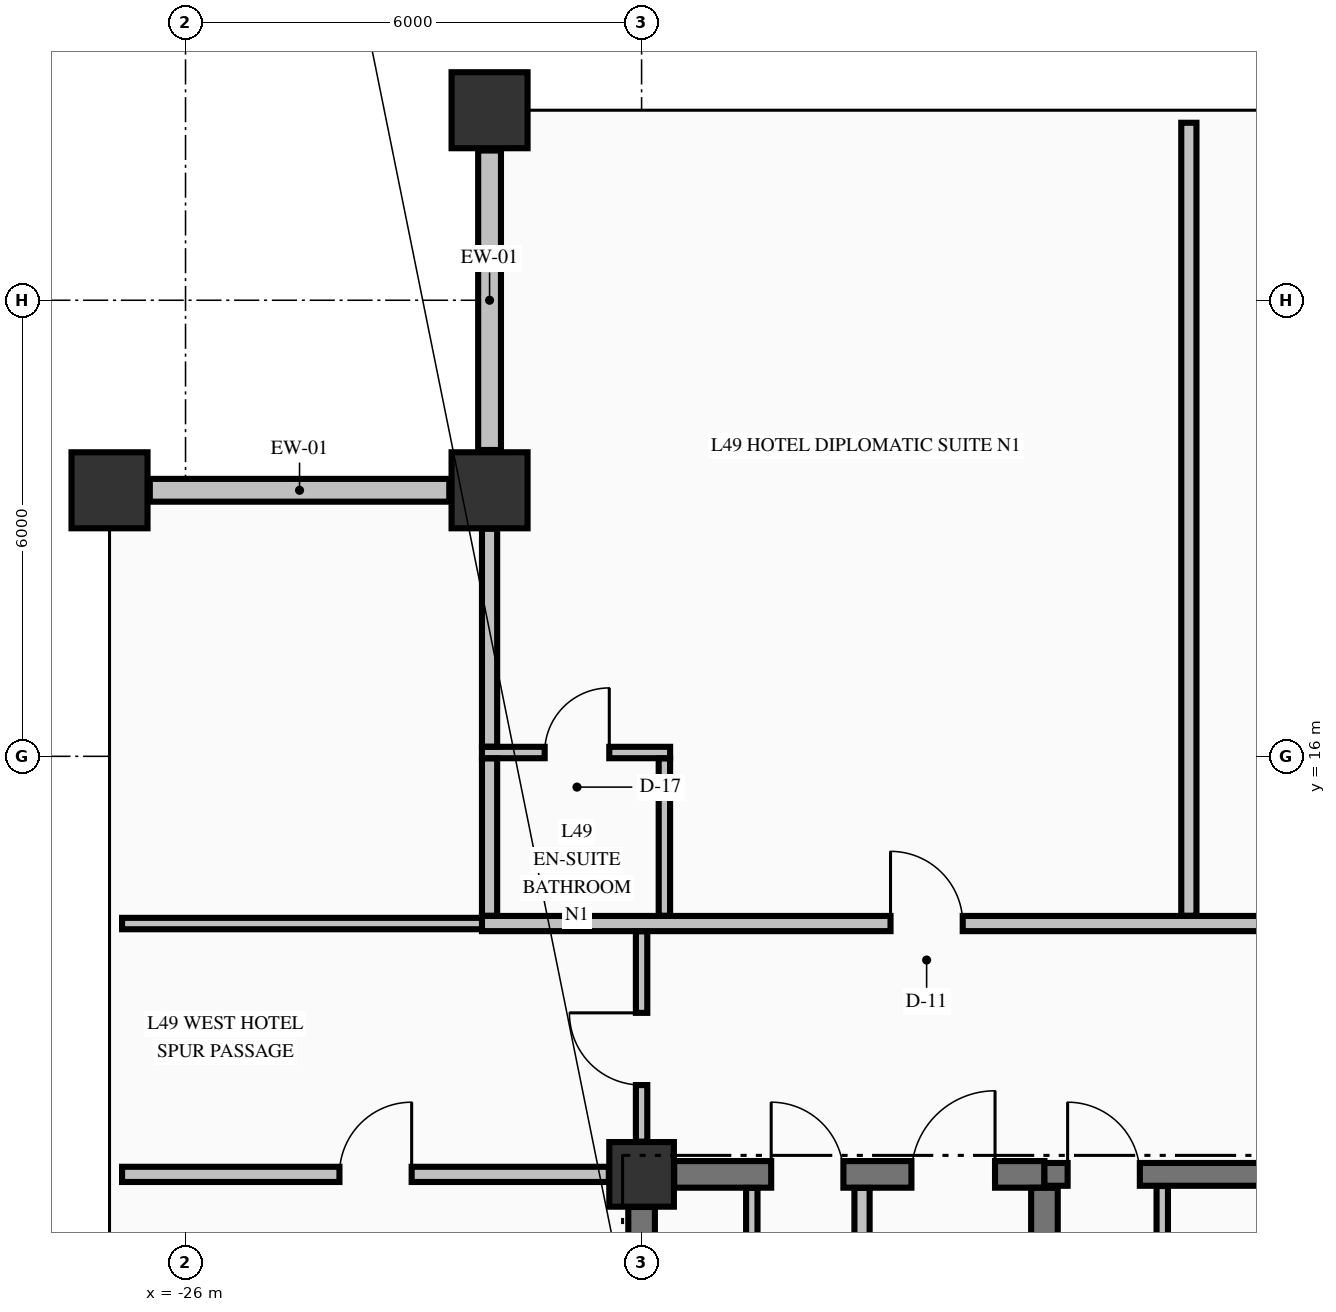
"""IFC4 building model, lengths in metres.
Left out: names, types, materials, properties, quantities, classifications, styles, units other than length and angle.
Written with IfcOpenShell. Run it as: python <this file> out.ifc"""

import sys

from ifc_helpers import new_model, si_unit, direction, frame, frame_2d, origin, origin_2d, place, context, subcontext, project, spatial, rectangle, extrude, element, fill, save


model = new_model("IFC4")
c1 = context("Model", 3, precision=1e-05, world=origin(), true_north=direction((0.0, 1.0)))
c2 = subcontext(c1, "Body", "Model", "MODEL_VIEW")
j1 = project(units=[si_unit("LENGTHUNIT", "METRE"), si_unit("PLANEANGLEUNIT", "RADIAN")], contexts=[c1])
p1 = place(None, origin())
s1 = spatial("IfcSite", under=j1, at=p1, CompositionType="ELEMENT")
p2 = place(p1, origin())
s2 = spatial("IfcBuilding", under=s1, at=p2, CompositionType="ELEMENT")
p3 = place(p2, frame((0.0, 0.0, 191.46)))
s3 = spatial("IfcBuildingStorey", under=s2, at=p3, CompositionType="ELEMENT", Elevation=191.46)
for number, where, z_axis, x_axis in (
    (1, (-22.0, 24.5, -0.425), (0.0, 0.0, 1.0), (1.0, 0.0, 0.0)),
    (2, (-27.0, 19.5, -0.425), (0.0, 0.0, 1.0), (1.0, 0.0, 0.0)),
    (3, (-22.0, 19.5, -0.425), (0.0, 0.0, 1.0), (1.0, 0.0, 0.0)),
):
    element("IfcColumn", number, at=place(p3, frame(where, z_axis=z_axis, x_axis=x_axis)), inside=s3, PredefinedType="COLUMN", context=c2, shape_type="SweptSolid", body=[
        extrude(rectangle(XDim=1.0, YDim=1.0, at=origin_2d()), origin(), (0.0, 0.0, 1.0), 3.55),
    ])
p4 = place(p3, frame((-20.0, 10.5, -0.425), z_axis=(0.0, 0.0, 1.0), x_axis=(1.0, 0.0, 0.0)))
e4 = element("IfcColumn", 4, at=p4, inside=s3, PredefinedType="COLUMN", context=c2, shape_type="SweptSolid", body=[
    extrude(rectangle(XDim=0.85, YDim=0.85, at=origin_2d()), origin(), (0.0, 0.0, 1.0), 3.55),
])
for number, where, z_axis, x_axis in (
    (5, (-22.0, 23.97, 0.0), (0.0, 0.0, 1.0), (0.0, -1.0, 0.0)),
    (6, (-22.53, 19.5, 0.0), (0.0, 0.0, 1.0), (-1.0, 0.0, 0.0)),
):
    element("IfcWall", number, at=place(p3, frame(where, z_axis=z_axis, x_axis=x_axis)), inside=s3, PredefinedType="STANDARD", context=c2, shape_type="SweptSolid", body=[
        extrude(rectangle(XDim=3.94, YDim=0.3, at=frame_2d((1.97, 0.0))), origin(), (0.0, 0.0, 1.0), 1.317),
    ])
p5 = place(p3, frame((-19.571, 10.5, 0.0), z_axis=(0.0, 0.0, 1.0), x_axis=(1.0, 0.0, 0.0)))
e7 = element("IfcWall", 7, at=p5, inside=s3, PredefinedType="SHEAR", context=c2, shape_type="SweptSolid", body=[
    extrude(rectangle(XDim=4.871, YDim=0.35, at=frame_2d((2.436, 0.0))), origin(), (0.0, 0.0, 1.0), 3.125),
])
p6 = place(p5, frame((3.121, 0.0, 0.0)))
e8 = element("IfcOpeningElement", 8, at=p6, cuts=e7, PredefinedType="OPENING", context=c2, shape_type="SweptSolid", body=[
    extrude(rectangle(XDim=1.1, YDim=2.15, at=frame_2d((0.55, 1.075))), frame((0.0, 0.185, 0.0), z_axis=(0.0, -1.0, 0.0), x_axis=(1.0, 0.0, 0.0)), (0.0, 0.0, 1.0), 0.37),
])
p7 = place(p5, frame((1.276, 0.0, 0.0)))
e9 = element("IfcOpeningElement", 9, at=p7, cuts=e7, PredefinedType="OPENING", context=c2, shape_type="SweptSolid", body=[
    extrude(rectangle(XDim=0.95, YDim=2.15, at=frame_2d((0.475, 1.075))), frame((0.0, 0.185, 0.0), z_axis=(0.0, -1.0, 0.0), x_axis=(1.0, 0.0, 0.0)), (0.0, 0.0, 1.0), 0.37),
])
p8 = place(p3, frame((-14.7, 10.5, 0.0), z_axis=(0.0, 0.0, 1.0), x_axis=(1.0, 0.0, 0.0)))
e10 = element("IfcWall", 10, at=p8, inside=s3, PredefinedType="SHEAR", context=c2, shape_type="SweptSolid", body=[
    extrude(rectangle(XDim=3.271, YDim=0.3, at=frame_2d((1.635, 0.0))), origin(), (0.0, 0.0, 1.0), 3.125),
])
p9 = place(p8, frame((0.305, 0.0, 0.0)))
e11 = element("IfcOpeningElement", 11, at=p9, cuts=e10, PredefinedType="OPENING", context=c2, shape_type="SweptSolid", body=[
    extrude(rectangle(XDim=0.95, YDim=2.15, at=frame_2d((0.475, 1.075))), frame((0.0, 0.16, 0.0), z_axis=(0.0, -1.0, 0.0), x_axis=(1.0, 0.0, 0.0)), (0.0, 0.0, 1.0), 0.32),
])
p10 = place(p3, frame((-26.835, 10.5, 0.0), z_axis=(0.0, 0.0, 1.0), x_axis=(1.0, 0.0, 0.0)))
e12 = element("IfcWall", 12, at=p10, inside=s3, PredefinedType="PARTITIONING", context=c2, shape_type="SweptSolid", body=[
    extrude(rectangle(XDim=6.404, YDim=0.2, at=frame_2d((3.202, 0.0))), origin(), (0.0, 0.0, 1.0), 3.125),
])
p11 = place(p10, frame((2.86, 0.0, 0.0)))
e13 = element("IfcOpeningElement", 13, at=p11, cuts=e12, PredefinedType="OPENING", context=c2, shape_type="SweptSolid", body=[
    extrude(rectangle(XDim=0.95, YDim=2.15, at=frame_2d((0.475, 1.075))), frame((0.0, 0.11, 0.0), z_axis=(0.0, -1.0, 0.0), x_axis=(1.0, 0.0, 0.0)), (0.0, 0.0, 1.0), 0.22),
])
p12 = place(p3, frame((-26.835, 13.8, 0.0), z_axis=(0.0, 0.0, 1.0), x_axis=(1.0, 0.0, 0.0)))
e14 = element("IfcWall", 14, at=p12, inside=s3, PredefinedType="PARTITIONING", context=c2, shape_type="SweptSolid", body=[
    extrude(rectangle(XDim=4.935, YDim=0.15, at=frame_2d((2.468, 0.0))), origin(), (0.0, 0.0, 1.0), 3.125),
])
p13 = place(p3, frame((-22.1, 13.8, 0.0), z_axis=(0.0, 0.0, 1.0), x_axis=(1.0, 0.0, 0.0)))
e15 = element("IfcWall", 15, at=p13, inside=s3, PredefinedType="PARTITIONING", context=c2, shape_type="SweptSolid", body=[
    extrude(rectangle(XDim=39.2, YDim=0.2, at=frame_2d((19.6, 0.0))), origin(), (0.0, 0.0, 1.0), 3.125),
])
p14 = place(p13, frame((5.375, 0.0, 0.0)))
e16 = element("IfcOpeningElement", 16, at=p14, cuts=e15, PredefinedType="OPENING", context=c2, shape_type="SweptSolid", body=[
    extrude(rectangle(XDim=0.95, YDim=2.15, at=frame_2d((0.475, 1.075))), frame((0.0, 0.11, 0.0), z_axis=(0.0, -1.0, 0.0), x_axis=(1.0, 0.0, 0.0)), (0.0, 0.0, 1.0), 0.22),
])
p15 = place(p13, frame((13.375, 0.0, 0.0)))
e17 = element("IfcOpeningElement", 17, at=p15, cuts=e15, PredefinedType="OPENING", context=c2, shape_type="SweptSolid", body=[
    extrude(rectangle(XDim=1.05, YDim=2.15, at=frame_2d((0.525, 1.075))), frame((0.0, 0.11, 0.0), z_axis=(0.0, -1.0, 0.0), x_axis=(1.0, 0.0, 0.0)), (0.0, 0.0, 1.0), 0.22),
])
p16 = place(p13, frame((23.875, 0.0, 0.0)))
e18 = element("IfcOpeningElement", 18, at=p16, cuts=e15, PredefinedType="OPENING", context=c2, shape_type="SweptSolid", body=[
    extrude(rectangle(XDim=0.95, YDim=2.15, at=frame_2d((0.475, 1.075))), frame((0.0, 0.11, 0.0), z_axis=(0.0, -1.0, 0.0), x_axis=(1.0, 0.0, 0.0)), (0.0, 0.0, 1.0), 0.22),
])
p17 = place(p13, frame((34.175, 0.0, 0.0)))
e19 = element("IfcOpeningElement", 19, at=p17, cuts=e15, PredefinedType="OPENING", context=c2, shape_type="SweptSolid", body=[
    extrude(rectangle(XDim=0.95, YDim=2.15, at=frame_2d((0.475, 1.075))), frame((0.0, 0.11, 0.0), z_axis=(0.0, -1.0, 0.0), x_axis=(1.0, 0.0, 0.0)), (0.0, 0.0, 1.0), 0.22),
])
p18 = place(p3, frame((-22.1, 16.05, 0.0), z_axis=(0.0, 0.0, 1.0), x_axis=(1.0, 0.0, 0.0)))
e20 = element("IfcWall", 20, at=p18, inside=s3, PredefinedType="PARTITIONING", context=c2, shape_type="SweptSolid", body=[
    extrude(rectangle(XDim=2.475, YDim=0.15, at=frame_2d((1.238, 0.0))), origin(), (0.0, 0.0, 1.0), 3.125),
])
p19 = place(p18, frame((0.825, 0.0, 0.0)))
e21 = element("IfcOpeningElement", 21, at=p19, cuts=e20, PredefinedType="OPENING", context=c2, shape_type="SweptSolid", body=[
    extrude(rectangle(XDim=0.85, YDim=2.1, at=frame_2d((0.425, 1.05))), frame((0.0, 0.085, 0.0), z_axis=(0.0, -1.0, 0.0), x_axis=(1.0, 0.0, 0.0)), (0.0, 0.0, 1.0), 0.17),
])
p20 = place(p3, frame((-20.0, 5.327, 0.0), z_axis=(0.0, 0.0, 1.0), x_axis=(0.0, 1.0, 0.0)))
e22 = element("IfcWall", 22, at=p20, inside=s3, PredefinedType="SHEAR", context=c2, shape_type="SweptSolid", body=[
    extrude(rectangle(XDim=4.744, YDim=0.35, at=frame_2d((2.372, 0.0))), origin(), (0.0, 0.0, 1.0), 3.125),
])
p21 = place(p3, frame((-14.7, 5.852, 0.0), z_axis=(0.0, 0.0, 1.0), x_axis=(0.0, 1.0, 0.0)))
e23 = element("IfcWall", 23, at=p21, inside=s3, PredefinedType="SHEAR", context=c2, shape_type="SweptSolid", body=[
    extrude(rectangle(XDim=4.471, YDim=0.35, at=frame_2d((2.235, 0.0))), origin(), (0.0, 0.0, 1.0), 3.125),
])
p22 = place(p3, frame((-22.0, 13.903, 0.0), z_axis=(0.0, 0.0, 1.0), x_axis=(0.0, 1.0, 0.0)))
e24 = element("IfcWall", 24, at=p22, inside=s3, PredefinedType="PARTITIONING", context=c2, shape_type="SweptSolid", body=[
    extrude(rectangle(XDim=2.069, YDim=0.2, at=frame_2d((1.034, 0.0))), origin(), (0.0, 0.0, 1.0), 3.125),
])
p23 = place(p3, frame((-22.0, 16.128, 0.0), z_axis=(0.0, 0.0, 1.0), x_axis=(0.0, 1.0, 0.0)))
e25 = element("IfcWall", 25, at=p23, inside=s3, PredefinedType="PARTITIONING", context=c2, shape_type="SweptSolid", body=[
    extrude(rectangle(XDim=2.866, YDim=0.2, at=frame_2d((1.433, 0.0))), origin(), (0.0, 0.0, 1.0), 3.125),
])
p24 = place(p3, frame((-20.0, 10.931, 0.0), z_axis=(0.0, 0.0, 1.0), x_axis=(0.0, 1.0, 0.0)))
e26 = element("IfcWall", 26, at=p24, inside=s3, PredefinedType="PARTITIONING", context=c2, shape_type="SweptSolid", body=[
    extrude(rectangle(XDim=2.766, YDim=0.15, at=frame_2d((1.383, 0.0))), origin(), (0.0, 0.0, 1.0), 2.317),
])
p25 = place(p24, frame((0.744, 0.0, 0.0)))
e27 = element("IfcOpeningElement", 27, at=p25, cuts=e26, PredefinedType="OPENING", context=c2, shape_type="SweptSolid", body=[
    extrude(rectangle(XDim=0.95, YDim=2.15, at=frame_2d((0.475, 1.075))), frame((0.0, 0.085, 0.0), z_axis=(0.0, -1.0, 0.0), x_axis=(1.0, 0.0, 0.0)), (0.0, 0.0, 1.0), 0.17),
])
p26 = place(p3, frame((-19.7, 13.903, 0.0), z_axis=(0.0, 0.0, 1.0), x_axis=(0.0, 1.0, 0.0)))
e28 = element("IfcWall", 28, at=p26, inside=s3, PredefinedType="PARTITIONING", context=c2, shape_type="SweptSolid", body=[
    extrude(rectangle(XDim=2.069, YDim=0.15, at=frame_2d((1.034, 0.0))), origin(), (0.0, 0.0, 1.0), 2.317),
])
p27 = place(p3, frame((-18.55, 5.328, 0.0), z_axis=(0.0, 0.0, 1.0), x_axis=(0.0, 1.0, 0.0)))
e29 = element("IfcWall", 29, at=p27, inside=s3, PredefinedType="PARTITIONING", context=c2, shape_type="SweptSolid", body=[
    extrude(rectangle(XDim=4.994, YDim=0.15, at=frame_2d((2.497, 0.0))), origin(), (0.0, 0.0, 1.0), 3.125),
])
p28 = place(p27, frame((2.047, 0.0, 0.0)))
e30 = element("IfcOpeningElement", 30, at=p28, cuts=e29, PredefinedType="OPENING", context=c2, shape_type="SweptSolid", body=[
    extrude(rectangle(XDim=0.95, YDim=2.15, at=frame_2d((0.475, 1.075))), frame((0.0, 0.085, 0.0), z_axis=(0.0, -1.0, 0.0), x_axis=(1.0, 0.0, 0.0)), (0.0, 0.0, 1.0), 0.17),
])
p29 = place(p3, frame((-17.1, 5.328, 0.0), z_axis=(0.0, 0.0, 1.0), x_axis=(0.0, 1.0, 0.0)))
e31 = element("IfcWall", 31, at=p29, inside=s3, PredefinedType="PARTITIONING", context=c2, shape_type="SweptSolid", body=[
    extrude(rectangle(XDim=4.994, YDim=0.2, at=frame_2d((2.497, 0.0))), origin(), (0.0, 0.0, 1.0), 3.125),
])
p30 = place(p3, frame((-13.15, 7.228, 0.0), z_axis=(0.0, 0.0, 1.0), x_axis=(0.0, 1.0, 0.0)))
e32 = element("IfcWall", 32, at=p30, inside=s3, PredefinedType="PARTITIONING", context=c2, shape_type="SweptSolid", body=[
    extrude(rectangle(XDim=3.119, YDim=0.15, at=frame_2d((1.56, 0.0))), origin(), (0.0, 0.0, 1.0), 3.125),
])
p31 = place(p30, frame((1.097, 0.0, 0.0)))
e33 = element("IfcOpeningElement", 33, at=p31, cuts=e32, PredefinedType="OPENING", context=c2, shape_type="SweptSolid", body=[
    extrude(rectangle(XDim=0.95, YDim=2.15, at=frame_2d((0.475, 1.075))), frame((0.0, 0.085, 0.0), z_axis=(0.0, -1.0, 0.0), x_axis=(1.0, 0.0, 0.0)), (0.0, 0.0, 1.0), 0.17),
])
p32 = place(p3, frame((-12.8, 13.903, 0.0), z_axis=(0.0, 0.0, 1.0), x_axis=(0.0, 1.0, 0.0)))
e34 = element("IfcWall", 34, at=p32, inside=s3, PredefinedType="PARTITIONING", context=c2, shape_type="SweptSolid", body=[
    extrude(rectangle(XDim=10.432, YDim=0.2, at=frame_2d((5.216, 0.0))), origin(), (0.0, 0.0, 1.0), 3.125),
])
p33 = place(p9, origin())
e35 = element("IfcDoor", 35, at=p33, inside=s3, OperationType="SINGLE_SWING_LEFT", PredefinedType="DOOR", context=c2, shape_type="SweptSolid", body=[
    extrude(rectangle(XDim=0.95, YDim=2.15, at=frame_2d((0.475, 1.075))), frame((0.0, 0.025, 0.0), z_axis=(0.0, -1.0, 0.0), x_axis=(1.0, 0.0, 0.0)), (0.0, 0.0, 1.0), 0.05),
])
fill(e11, e35)
p34 = place(p6, origin())
e36 = element("IfcDoor", 36, at=p34, inside=s3, OperationType="SINGLE_SWING_RIGHT", PredefinedType="DOOR", context=c2, shape_type="SweptSolid", body=[
    extrude(rectangle(XDim=1.1, YDim=2.15, at=frame_2d((0.55, 1.075))), frame((0.0, 0.025, 0.0), z_axis=(0.0, -1.0, 0.0), x_axis=(1.0, 0.0, 0.0)), (0.0, 0.0, 1.0), 0.05),
])
fill(e8, e36)
p35 = place(p7, origin())
e37 = element("IfcDoor", 37, at=p35, inside=s3, OperationType="SINGLE_SWING_LEFT", PredefinedType="DOOR", context=c2, shape_type="SweptSolid", body=[
    extrude(rectangle(XDim=0.95, YDim=2.15, at=frame_2d((0.475, 1.075))), frame((0.0, 0.025, 0.0), z_axis=(0.0, -1.0, 0.0), x_axis=(1.0, 0.0, 0.0)), (0.0, 0.0, 1.0), 0.05),
])
fill(e9, e37)
p36 = place(p14, origin())
e38 = element("IfcDoor", 38, at=p36, inside=s3, OperationType="SINGLE_SWING_LEFT", PredefinedType="DOOR", context=c2, shape_type="SweptSolid", body=[
    extrude(rectangle(XDim=0.95, YDim=2.15, at=frame_2d((0.475, 1.075))), frame((0.0, 0.025, 0.0), z_axis=(0.0, -1.0, 0.0), x_axis=(1.0, 0.0, 0.0)), (0.0, 0.0, 1.0), 0.05),
])
fill(e16, e38)
p37 = place(p19, origin())
e39 = element("IfcDoor", 39, at=p37, inside=s3, OperationType="SINGLE_SWING_RIGHT", PredefinedType="DOOR", context=c2, shape_type="SweptSolid", body=[
    extrude(rectangle(XDim=0.85, YDim=2.1, at=frame_2d((0.425, 1.05))), frame((0.0, 0.025, 0.0), z_axis=(0.0, -1.0, 0.0), x_axis=(1.0, 0.0, 0.0)), (0.0, 0.0, 1.0), 0.05),
])
fill(e21, e39)
p38 = place(p25, origin())
e40 = element("IfcDoor", 40, at=p38, inside=s3, OperationType="SINGLE_SWING_RIGHT", PredefinedType="DOOR", context=c2, shape_type="SweptSolid", body=[
    extrude(rectangle(XDim=0.95, YDim=2.15, at=frame_2d((0.475, 1.075))), frame((0.0, 0.025, 0.0), z_axis=(0.0, -1.0, 0.0), x_axis=(1.0, 0.0, 0.0)), (0.0, 0.0, 1.0), 0.05),
])
fill(e27, e40)
p39 = place(p11, origin())
e41 = element("IfcDoor", 41, at=p39, inside=s3, OperationType="SINGLE_SWING_RIGHT", PredefinedType="DOOR", context=c2, shape_type="SweptSolid", body=[
    extrude(rectangle(XDim=0.95, YDim=2.15, at=frame_2d((0.475, 1.075))), frame((0.0, 0.025, 0.0), z_axis=(0.0, -1.0, 0.0), x_axis=(1.0, 0.0, 0.0)), (0.0, 0.0, 1.0), 0.05),
])
fill(e13, e41)
save(model, sys.argv[1])
